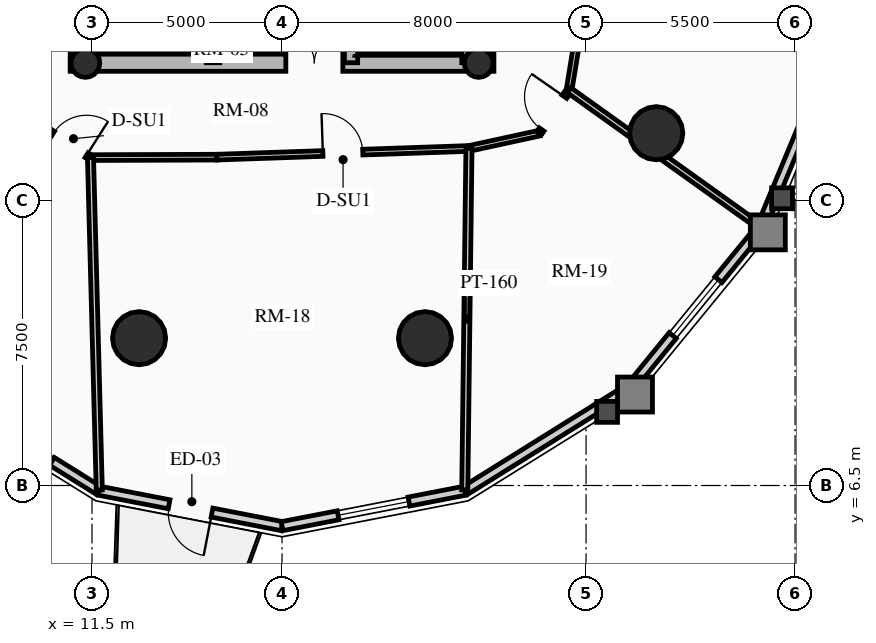
"""IFC4 building model, lengths in metres.
Left out: names, types, materials, properties, quantities, classifications, styles, units other than length and angle.
Written with IfcOpenShell. Run it as: python <this file> out.ifc"""

import sys

from ifc_helpers import new_model, si_unit, direction, frame, frame_2d, origin, origin_2d, place, context, subcontext, project, spatial, rectangle, circle, hollow_circle, extrude, source, transform, mapped, element, fill, save


model = new_model("IFC4")
c1 = context("Model", 3, precision=1e-05, world=origin(), true_north=direction((0.0, 1.0)))
c2 = subcontext(c1, "Body", "Model", "MODEL_VIEW")
j1 = project(units=[si_unit("LENGTHUNIT", "METRE"), si_unit("PLANEANGLEUNIT", "RADIAN")], contexts=[c1])
p1 = place(None, origin())
s1 = spatial("IfcSite", under=j1, at=p1, CompositionType="ELEMENT")
p2 = place(p1, origin())
s2 = spatial("IfcBuilding", under=s1, at=p2, CompositionType="ELEMENT")
p3 = place(p2, frame((0.0, 0.0, 84.7)))
s3 = spatial("IfcBuildingStorey", under=s2, at=p3, CompositionType="ELEMENT", Elevation=84.7)
for number, where, z_axis, x_axis in (
    (1, (11.15, 17.4, 0.0), (0.0, 0.0, 1.0), (0.0, 1.0, 0.0)),
    (2, (21.85, 17.4, 0.0), (0.0, 0.0, 1.0), (0.0, 1.0, 0.0)),
):
    element("IfcWall", number, at=place(p3, frame(where, z_axis=z_axis, x_axis=x_axis)), inside=s3, PredefinedType="SHEAR", context=c2, shape_type="SweptSolid", body=[
        extrude(rectangle(XDim=14.2, YDim=0.45, at=frame_2d((7.1, 0.0))), origin(), (0.0, 0.0, 1.0), 2.91),
    ])
p4 = place(p3, frame((11.15, 17.625, 0.0), z_axis=(0.0, 0.0, 1.0), x_axis=(1.0, 0.0, 0.0)))
e3 = element("IfcWall", 3, at=p4, inside=s3, PredefinedType="SHEAR", context=c2, shape_type="SweptSolid", body=[
    extrude(rectangle(XDim=10.7, YDim=0.45, at=frame_2d((5.35, 0.0))), origin(), (0.0, 0.0, 1.0), 2.91),
])
m1 = source(origin(), c2, "Body", "SweptSolid", [
    extrude(rectangle(XDim=1.5, YDim=2.02, at=frame_2d((0.75, 1.01))), frame((0.0, 0.235, 0.0), z_axis=(0.0, -1.0, 0.0), x_axis=(1.0, 0.0, 0.0)), (0.0, 0.0, 1.0), 0.47),
])
p5 = place(p4, frame((5.45, 0.0, 0.0)))
e4 = element("IfcOpeningElement", 4, at=p5, cuts=e3, PredefinedType="OPENING", context=c2, shape_type="MappedRepresentation", body=[
    mapped(m1, transform((0.0, 0.0, 0.0), x_axis=(1.0, 0.0, 0.0), y_axis=(0.0, 1.0, 0.0), z_axis=(0.0, 0.0, 1.0), scale=1.0)),
])
p6 = place(p3, frame((14.685, 17.625, 0.0), z_axis=(0.0, 0.0, 1.0), x_axis=(0.0, 1.0, 0.0)))
e5 = element("IfcWall", 5, at=p6, inside=s3, PredefinedType="SHEAR", context=c2, shape_type="SweptSolid", body=[
    extrude(rectangle(XDim=13.75, YDim=0.35, at=frame_2d((6.875, 0.0))), origin(), (0.0, 0.0, 1.0), 2.91),
])
m2 = source(origin(), c2, "Body", "SweptSolid", [
    extrude(rectangle(XDim=1.1, YDim=2.015, at=frame_2d((0.55, 1.007))), frame((0.0, 0.185, 0.0), z_axis=(0.0, -1.0, 0.0), x_axis=(1.0, 0.0, 0.0)), (0.0, 0.0, 1.0), 0.37),
])
p7 = place(p6, frame((4.875, 0.0, 0.0)))
e6 = element("IfcOpeningElement", 6, at=p7, cuts=e5, PredefinedType="OPENING", context=c2, shape_type="MappedRepresentation", body=[
    mapped(m2, transform((0.0, 0.0, 0.0), x_axis=(1.0, 0.0, 0.0), y_axis=(0.0, 1.0, 0.0), z_axis=(0.0, 0.0, 1.0), scale=1.0)),
])
m3 = source(origin(), c2, "Body", "SweptSolid", [
    extrude(rectangle(XDim=1.15, YDim=2.02, at=frame_2d((0.575, 1.01))), frame((0.0, 0.185, 0.0), z_axis=(0.0, -1.0, 0.0), x_axis=(1.0, 0.0, 0.0)), (0.0, 0.0, 1.0), 0.37),
])
p8 = place(p6, frame((7.295, 0.0, 0.0)))
e7 = element("IfcOpeningElement", 7, at=p8, cuts=e5, PredefinedType="OPENING", context=c2, shape_type="MappedRepresentation", body=[
    mapped(m3, transform((0.0, 0.0, 0.0), x_axis=(1.0, 0.0, 0.0), y_axis=(0.0, 1.0, 0.0), z_axis=(0.0, 0.0, 1.0), scale=1.0)),
])
p9 = place(p3, frame((18.315, 17.625, 0.0), z_axis=(0.0, 0.0, 1.0), x_axis=(0.0, 1.0, 0.0)))
e8 = element("IfcWall", 8, at=p9, inside=s3, PredefinedType="SHEAR", context=c2, shape_type="SweptSolid", body=[
    extrude(rectangle(XDim=13.75, YDim=0.35, at=frame_2d((6.875, 0.0))), origin(), (0.0, 0.0, 1.0), 2.91),
])
p10 = place(p9, frame((10.0, 0.0, 0.0)))
e9 = element("IfcOpeningElement", 9, at=p10, cuts=e8, PredefinedType="OPENING", context=c2, shape_type="MappedRepresentation", body=[
    mapped(m2, transform((0.0, 0.0, 0.0), x_axis=(1.0, 0.0, 0.0), y_axis=(0.0, 1.0, 0.0), z_axis=(0.0, 0.0, 1.0), scale=1.0)),
])
p11 = place(p9, frame((12.0, 0.0, 0.0)))
e10 = element("IfcOpeningElement", 10, at=p11, cuts=e8, PredefinedType="OPENING", context=c2, shape_type="MappedRepresentation", body=[
    mapped(m2, transform((0.0, 0.0, 0.0), x_axis=(1.0, 0.0, 0.0), y_axis=(0.0, 1.0, 0.0), z_axis=(0.0, 0.0, 1.0), scale=1.0)),
])
p12 = place(p9, frame((5.305, 0.0, 0.0)))
e11 = element("IfcOpeningElement", 11, at=p12, cuts=e8, PredefinedType="OPENING", context=c2, shape_type="MappedRepresentation", body=[
    mapped(m3, transform((0.0, 0.0, 0.0), x_axis=(1.0, 0.0, 0.0), y_axis=(0.0, 1.0, 0.0), z_axis=(0.0, 0.0, 1.0), scale=1.0)),
])
p13 = place(p3, frame((21.405, 17.625, 0.0), z_axis=(0.0, 0.0, 1.0), x_axis=(0.0, 1.0, 0.0)))
e12 = element("IfcWall", 12, at=p13, inside=s3, PredefinedType="SHEAR", context=c2, shape_type="SweptSolid", body=[
    extrude(rectangle(XDim=6.72, YDim=0.35, at=frame_2d((3.36, 0.0))), origin(), (0.0, 0.0, 1.0), 2.91),
])
for number, where, z_axis, x_axis in (
    (13, (11.325, 17.62, 0.0), (0.0, 0.0, 1.0), (1.0, 0.0, 0.0)),
    (14, (21.675, 17.62, 0.0), (0.0, 0.0, 1.0), (1.0, 0.0, 0.0)),
):
    element("IfcColumn", number, at=place(p3, frame(where, z_axis=z_axis, x_axis=x_axis)), inside=s3, PredefinedType="COLUMN", context=c2, shape_type="SweptSolid", body=[
        extrude(hollow_circle(Radius=0.38, WallThickness=0.032, at=origin_2d()), origin(), (0.0, 0.0, 1.0), 2.91),
    ])
for number, where, z_axis, x_axis in (
    (15, (12.739, 10.377, 0.0), (0.0, 0.0, 1.0), (1.0, 0.0, 0.0)),
    (16, (20.261, 10.377, 0.0), (0.0, 0.0, 1.0), (1.0, 0.0, 0.0)),
    (17, (26.347, 15.771, 0.0), (0.0, 0.0, 1.0), (1.0, 0.0, 0.0)),
):
    element("IfcColumn", number, at=place(p3, frame(where, z_axis=z_axis, x_axis=x_axis)), inside=s3, PredefinedType="USERDEFINED", context=c2, shape_type="SweptSolid", body=[
        extrude(circle(Radius=0.7, at=origin_2d()), origin(), (0.0, 0.0, 1.0), 2.91),
    ])
p14 = place(p3, frame((11.685, 6.363, 0.0), z_axis=(0.0, 0.0, 1.0), x_axis=(-0.848520380187, 0.529162701263, 0.0)))
e18 = element("IfcWall", 18, at=p14, inside=s3, PredefinedType="SOLIDWALL", context=c2, shape_type="SweptSolid", body=[
    extrude(rectangle(XDim=5.119, YDim=0.24, at=frame_2d((2.56, 0.0))), origin(), (0.0, 0.0, 1.0), 2.179),
])
m4 = source(origin(), c2, "Body", "SweptSolid", [
    extrude(rectangle(XDim=2.2, YDim=1.35, at=frame_2d((1.1, 0.675))), frame((0.0, 0.13, 0.0), z_axis=(0.0, -1.0, 0.0), x_axis=(1.0, 0.0, 0.0)), (0.0, 0.0, 1.0), 0.26),
])
p15 = place(p14, frame((1.459, 0.0, 0.65)))
e19 = element("IfcOpeningElement", 19, at=p15, cuts=e18, PredefinedType="OPENING", context=c2, shape_type="MappedRepresentation", body=[
    mapped(m4, transform((0.0, 0.0, 0.0), x_axis=(1.0, 0.0, 0.0), y_axis=(0.0, 1.0, 0.0), z_axis=(0.0, 0.0, 1.0), scale=1.0)),
])
p16 = place(p3, frame((16.5, 5.43, 0.0), z_axis=(0.0, 0.0, 1.0), x_axis=(-0.981723785992, 0.190311344954, 0.0)))
e20 = element("IfcWall", 20, at=p16, inside=s3, PredefinedType="SOLIDWALL", context=c2, shape_type="SweptSolid", body=[
    extrude(rectangle(XDim=4.904, YDim=0.24, at=frame_2d((2.452, 0.0))), origin(), (0.0, 0.0, 1.0), 2.179),
])
m5 = source(origin(), c2, "Body", "SweptSolid", [
    extrude(rectangle(XDim=1.15, YDim=2.005, at=frame_2d((0.575, 1.002))), frame((0.0, 0.13, 0.0), z_axis=(0.0, -1.0, 0.0), x_axis=(1.0, 0.0, 0.0)), (0.0, 0.0, 1.0), 0.26),
])
p17 = place(p16, frame((1.877, 0.0, 0.0)))
e21 = element("IfcOpeningElement", 21, at=p17, cuts=e20, PredefinedType="OPENING", context=c2, shape_type="MappedRepresentation", body=[
    mapped(m5, transform((0.0, 0.0, 0.0), x_axis=(1.0, 0.0, 0.0), y_axis=(0.0, 1.0, 0.0), z_axis=(0.0, 0.0, 1.0), scale=1.0)),
])
p18 = place(p3, frame((21.315, 6.363, 0.0), z_axis=(0.0, 0.0, 1.0), x_axis=(-0.981723785992, -0.190311344954, 0.0)))
e22 = element("IfcWall", 22, at=p18, inside=s3, PredefinedType="SOLIDWALL", context=c2, shape_type="SweptSolid", body=[
    extrude(rectangle(XDim=4.904, YDim=0.24, at=frame_2d((2.452, 0.0))), origin(), (0.0, 0.0, 1.0), 2.179),
])
m6 = source(origin(), c2, "Body", "SweptSolid", [
    extrude(rectangle(XDim=1.9, YDim=1.35, at=frame_2d((0.95, 0.675))), frame((0.0, 0.13, 0.0), z_axis=(0.0, -1.0, 0.0), x_axis=(1.0, 0.0, 0.0)), (0.0, 0.0, 1.0), 0.26),
])
p19 = place(p18, frame((1.502, 0.0, 0.65)))
e23 = element("IfcOpeningElement", 23, at=p19, cuts=e22, PredefinedType="OPENING", context=c2, shape_type="MappedRepresentation", body=[
    mapped(m6, transform((0.0, 0.0, 0.0), x_axis=(1.0, 0.0, 0.0), y_axis=(0.0, 1.0, 0.0), z_axis=(0.0, 0.0, 1.0), scale=1.0)),
])
p20 = place(p3, frame((25.658, 9.072, 0.0), z_axis=(0.0, 0.0, 1.0), x_axis=(-0.848520380187, -0.529162701263, 0.0)))
e24 = element("IfcWall", 24, at=p20, inside=s3, PredefinedType="SOLIDWALL", context=c2, shape_type="SweptSolid", body=[
    extrude(rectangle(XDim=5.119, YDim=0.24, at=frame_2d((2.56, 0.0))), origin(), (0.0, 0.0, 1.0), 2.179),
])
p21 = place(p3, frame((29.105, 13.291, 0.0), z_axis=(0.0, 0.0, 1.0), x_axis=(-0.632700781152, -0.77439635945, 0.0)))
e25 = element("IfcWall", 25, at=p21, inside=s3, PredefinedType="SOLIDWALL", context=c2, shape_type="SweptSolid", body=[
    extrude(rectangle(XDim=5.448, YDim=0.24, at=frame_2d((2.724, 0.0))), origin(), (0.0, 0.0, 1.0), 2.179),
])
p22 = place(p21, frame((1.774, 0.0, 0.65)))
e26 = element("IfcOpeningElement", 26, at=p22, cuts=e25, PredefinedType="OPENING", context=c2, shape_type="MappedRepresentation", body=[
    mapped(m6, transform((0.0, 0.0, 0.0), x_axis=(1.0, 0.0, 0.0), y_axis=(0.0, 1.0, 0.0), z_axis=(0.0, 0.0, 1.0), scale=1.0)),
])
p23 = place(p3, frame((31.318, 18.607, 0.0), z_axis=(0.0, 0.0, 1.0), x_axis=(-0.384344417632, -0.923189779317, 0.0)))
e27 = element("IfcWall", 27, at=p23, inside=s3, PredefinedType="SOLIDWALL", context=c2, shape_type="SweptSolid", body=[
    extrude(rectangle(XDim=5.758, YDim=0.24, at=frame_2d((2.879, 0.0))), origin(), (0.0, 0.0, 1.0), 2.179),
])
p24 = place(p3, frame((10.115, 15.983, 0.0), z_axis=(0.0, 0.0, 1.0), x_axis=(0.843995849351, -0.536349705209, 0.0)))
e28 = element("IfcWall", 28, at=p24, inside=s3, PredefinedType="PARTITIONING", context=c2, shape_type="SweptSolid", body=[
    extrude(rectangle(XDim=1.593, YDim=0.15, at=frame_2d((0.796, 0.0))), origin(), (0.0, 0.0, 1.0), 2.225),
])
m7 = source(origin(), c2, "Body", "SweptSolid", [
    extrude(rectangle(XDim=1.05, YDim=2.015, at=frame_2d((0.525, 1.007))), frame((0.0, 0.085, 0.0), z_axis=(0.0, -1.0, 0.0), x_axis=(1.0, 0.0, 0.0)), (0.0, 0.0, 1.0), 0.17),
])
p25 = place(p24, frame((0.423, 0.0, 0.0)))
e29 = element("IfcOpeningElement", 29, at=p25, cuts=e28, PredefinedType="OPENING", context=c2, shape_type="MappedRepresentation", body=[
    mapped(m7, transform((0.0, 0.0, 0.0), x_axis=(1.0, 0.0, 0.0), y_axis=(0.0, 1.0, 0.0), z_axis=(0.0, 0.0, 1.0), scale=1.0)),
])
p26 = place(p3, frame((11.46, 15.129, 0.0), z_axis=(0.0, 0.0, 1.0), x_axis=(0.999993513287, 0.003601858435, 0.0)))
e30 = element("IfcWall", 30, at=p26, inside=s3, PredefinedType="PARTITIONING", context=c2, shape_type="SweptSolid", body=[
    extrude(rectangle(XDim=3.321, YDim=0.15, at=frame_2d((1.661, 0.0))), origin(), (0.0, 0.0, 1.0), 2.225),
])
p27 = place(p3, frame((14.781, 15.141, 0.0), z_axis=(0.0, 0.0, 1.0), x_axis=(0.999407918707, 0.034406569513, 0.0)))
e31 = element("IfcWall", 31, at=p27, inside=s3, PredefinedType="PARTITIONING", context=c2, shape_type="SweptSolid", body=[
    extrude(rectangle(XDim=6.642, YDim=0.15, at=frame_2d((3.321, 0.0))), origin(), (0.0, 0.0, 1.0), 2.225),
])
p28 = place(p27, frame((2.796, 0.0, 0.0)))
e32 = element("IfcOpeningElement", 32, at=p28, cuts=e31, PredefinedType="OPENING", context=c2, shape_type="MappedRepresentation", body=[
    mapped(m7, transform((0.0, 0.0, 0.0), x_axis=(1.0, 0.0, 0.0), y_axis=(0.0, 1.0, 0.0), z_axis=(0.0, 0.0, 1.0), scale=1.0)),
])
p29 = place(p3, frame((21.419, 15.369, 0.0), z_axis=(0.0, 0.0, 1.0), x_axis=(0.977192701953, 0.212354475464, 0.0)))
e33 = element("IfcWall", 33, at=p29, inside=s3, PredefinedType="PARTITIONING", context=c2, shape_type="SweptSolid", body=[
    extrude(rectangle(XDim=1.888, YDim=0.15, at=frame_2d((0.944, 0.0))), origin(), (0.0, 0.0, 1.0), 2.225),
])
p30 = place(p3, frame((23.263, 15.77, 0.0), z_axis=(0.0, 0.0, 1.0), x_axis=(0.570743456919, 0.821128434768, 0.0)))
e34 = element("IfcWall", 34, at=p30, inside=s3, PredefinedType="PARTITIONING", context=c2, shape_type="SweptSolid", body=[
    extrude(rectangle(XDim=1.382, YDim=0.15, at=frame_2d((0.691, 0.0))), origin(), (0.0, 0.0, 1.0), 2.225),
])
p31 = place(p30, frame((0.12, 0.0, 0.0)))
e35 = element("IfcOpeningElement", 35, at=p31, cuts=e34, PredefinedType="OPENING", context=c2, shape_type="MappedRepresentation", body=[
    mapped(m7, transform((0.0, 0.0, 0.0), x_axis=(1.0, 0.0, 0.0), y_axis=(0.0, 1.0, 0.0), z_axis=(0.0, 0.0, 1.0), scale=1.0)),
])
p32 = place(p3, frame((24.052, 16.905, 0.0), z_axis=(0.0, 0.0, 1.0), x_axis=(0.162091534225, 0.986775726562, 0.0)))
e36 = element("IfcWall", 36, at=p32, inside=s3, PredefinedType="PARTITIONING", context=c2, shape_type="SweptSolid", body=[
    extrude(rectangle(XDim=1.613, YDim=0.15, at=frame_2d((0.807, 0.0))), origin(), (0.0, 0.0, 1.0), 2.225),
])
p33 = place(p3, frame((11.46, 15.129, 0.0), z_axis=(0.0, 0.0, 1.0), x_axis=(0.026480592098, -0.999649327636, 0.0)))
e37 = element("IfcWall", 37, at=p33, inside=s3, PredefinedType="PARTITIONING", context=c2, shape_type="SweptSolid", body=[
    extrude(rectangle(XDim=8.75, YDim=0.16, at=frame_2d((4.375, 0.0))), origin(), (0.0, 0.0, 1.0), 2.179),
])
p34 = place(p3, frame((21.419, 15.369, 0.0), z_axis=(0.0, 0.0, 1.0), x_axis=(-0.012251185903, -0.999924951406, 0.0)))
e38 = element("IfcWall", 38, at=p34, inside=s3, PredefinedType="PARTITIONING", context=c2, shape_type="SweptSolid", body=[
    extrude(rectangle(XDim=8.988, YDim=0.16, at=frame_2d((4.494, 0.0))), origin(), (0.0, 0.0, 1.0), 2.179),
])
p35 = place(p3, frame((24.052, 16.905, 0.0), z_axis=(0.0, 0.0, 1.0), x_axis=(0.813437670746, -0.581652091727, 0.0)))
e39 = element("IfcWall", 39, at=p35, inside=s3, PredefinedType="PARTITIONING", context=c2, shape_type="SweptSolid", body=[
    extrude(rectangle(XDim=6.192, YDim=0.16, at=frame_2d((3.096, 0.0))), origin(), (0.0, 0.0, 1.0), 2.179),
])
m8 = source(origin(), c2, "Body", "SweptSolid", [
    extrude(rectangle(XDim=2.2, YDim=1.35, at=frame_2d((1.1, 0.675))), frame((0.0, 0.03, 0.0), z_axis=(0.0, -1.0, 0.0), x_axis=(1.0, 0.0, 0.0)), (0.0, 0.0, 1.0), 0.06),
])
p36 = place(p15, origin())
e40 = element("IfcWindow", 40, at=p36, inside=s3, PartitioningType="DOUBLE_PANEL_VERTICAL", PredefinedType="WINDOW", context=c2, shape_type="MappedRepresentation", body=[
    mapped(m8, transform((0.0, 0.0, 0.0), x_axis=(1.0, 0.0, 0.0), y_axis=(0.0, 1.0, 0.0), z_axis=(0.0, 0.0, 1.0), scale=1.0)),
])
fill(e19, e40)
m9 = source(origin(), c2, "Body", "SweptSolid", [
    extrude(rectangle(XDim=1.15, YDim=2.005, at=frame_2d((0.575, 1.002))), frame((0.0, 0.025, 0.0), z_axis=(0.0, -1.0, 0.0), x_axis=(1.0, 0.0, 0.0)), (0.0, 0.0, 1.0), 0.05),
])
p37 = place(p17, origin())
e41 = element("IfcDoor", 41, at=p37, inside=s3, OperationType="SINGLE_SWING_LEFT", PredefinedType="DOOR", context=c2, shape_type="MappedRepresentation", body=[
    mapped(m9, transform((0.0, 0.0, 0.0), x_axis=(1.0, 0.0, 0.0), y_axis=(0.0, 1.0, 0.0), z_axis=(0.0, 0.0, 1.0), scale=1.0)),
])
fill(e21, e41)
m10 = source(origin(), c2, "Body", "SweptSolid", [
    extrude(rectangle(XDim=1.9, YDim=1.35, at=frame_2d((0.95, 0.675))), frame((0.0, 0.03, 0.0), z_axis=(0.0, -1.0, 0.0), x_axis=(1.0, 0.0, 0.0)), (0.0, 0.0, 1.0), 0.06),
])
p38 = place(p19, origin())
e42 = element("IfcWindow", 42, at=p38, inside=s3, PartitioningType="DOUBLE_PANEL_VERTICAL", PredefinedType="WINDOW", context=c2, shape_type="MappedRepresentation", body=[
    mapped(m10, transform((0.0, 0.0, 0.0), x_axis=(1.0, 0.0, 0.0), y_axis=(0.0, 1.0, 0.0), z_axis=(0.0, 0.0, 1.0), scale=1.0)),
])
fill(e23, e42)
p39 = place(p22, origin())
e43 = element("IfcWindow", 43, at=p39, inside=s3, PartitioningType="DOUBLE_PANEL_VERTICAL", PredefinedType="WINDOW", context=c2, shape_type="MappedRepresentation", body=[
    mapped(m10, transform((0.0, 0.0, 0.0), x_axis=(1.0, 0.0, 0.0), y_axis=(0.0, 1.0, 0.0), z_axis=(0.0, 0.0, 1.0), scale=1.0)),
])
fill(e26, e43)
m11 = source(origin(), c2, "Body", "SweptSolid", [
    extrude(rectangle(XDim=1.5, YDim=2.02, at=frame_2d((0.75, 1.01))), frame((0.0, 0.025, 0.0), z_axis=(0.0, -1.0, 0.0), x_axis=(1.0, 0.0, 0.0)), (0.0, 0.0, 1.0), 0.05),
])
p40 = place(p5, origin())
e44 = element("IfcDoor", 44, at=p40, inside=s3, OperationType="DOUBLE_DOOR_SINGLE_SWING", PredefinedType="DOOR", context=c2, shape_type="MappedRepresentation", body=[
    mapped(m11, transform((0.0, 0.0, 0.0), x_axis=(1.0, 0.0, 0.0), y_axis=(0.0, 1.0, 0.0), z_axis=(0.0, 0.0, 1.0), scale=1.0)),
])
fill(e4, e44)
m12 = source(origin(), c2, "Body", "SweptSolid", [
    extrude(rectangle(XDim=1.05, YDim=2.015, at=frame_2d((0.525, 1.007))), frame((0.0, 0.025, 0.0), z_axis=(0.0, -1.0, 0.0), x_axis=(1.0, 0.0, 0.0)), (0.0, 0.0, 1.0), 0.05),
])
p41 = place(p25, origin())
e45 = element("IfcDoor", 45, at=p41, inside=s3, OperationType="SINGLE_SWING_RIGHT", PredefinedType="DOOR", context=c2, shape_type="MappedRepresentation", body=[
    mapped(m12, transform((0.0, 0.0, 0.0), x_axis=(1.0, 0.0, 0.0), y_axis=(0.0, 1.0, 0.0), z_axis=(0.0, 0.0, 1.0), scale=1.0)),
])
fill(e29, e45)
p42 = place(p28, origin())
e46 = element("IfcDoor", 46, at=p42, inside=s3, OperationType="SINGLE_SWING_LEFT", PredefinedType="DOOR", context=c2, shape_type="MappedRepresentation", body=[
    mapped(m12, transform((0.0, 0.0, 0.0), x_axis=(1.0, 0.0, 0.0), y_axis=(0.0, 1.0, 0.0), z_axis=(0.0, 0.0, 1.0), scale=1.0)),
])
fill(e32, e46)
p43 = place(p31, origin())
e47 = element("IfcDoor", 47, at=p43, inside=s3, OperationType="SINGLE_SWING_RIGHT", PredefinedType="DOOR", context=c2, shape_type="MappedRepresentation", body=[
    mapped(m12, transform((0.0, 0.0, 0.0), x_axis=(1.0, 0.0, 0.0), y_axis=(0.0, 1.0, 0.0), z_axis=(0.0, 0.0, 1.0), scale=1.0)),
])
fill(e35, e47)
save(model, sys.argv[1])
